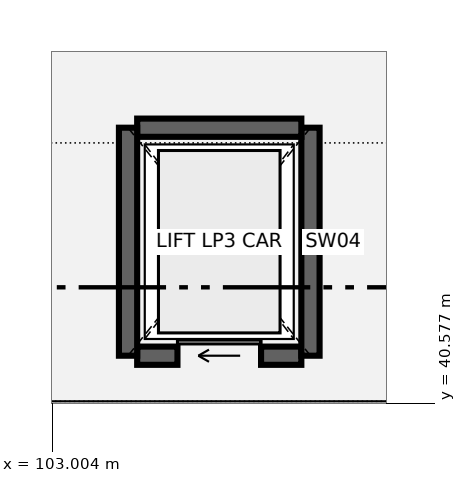
"""IFC4 building model, lengths in metres.
Left out: names, types, materials, properties, quantities, classifications, styles, units other than length and angle.
Written with IfcOpenShell. Run it as: python <this file> out.ifc"""

import sys

from ifc_helpers import new_model, si_unit, direction, frame, frame_2d, origin, place, context, subcontext, project, spatial, rectangle, extrude, element, fill, save


model = new_model("IFC4")
c1 = context("Model", 3, precision=1e-05, world=origin(), true_north=direction((0.0, 1.0)))
c2 = subcontext(c1, "Body", "Model", "MODEL_VIEW")
j1 = project(units=[si_unit("LENGTHUNIT", "METRE"), si_unit("PLANEANGLEUNIT", "RADIAN")], contexts=[c1])
p1 = place(None, origin())
s1 = spatial("IfcSite", under=j1, at=p1, CompositionType="ELEMENT")
p2 = place(p1, origin())
s2 = spatial("IfcBuilding", under=s1, at=p2, CompositionType="ELEMENT")
p3 = place(p2, frame((0.0, 0.0, 5.4)))
s3 = spatial("IfcBuildingStorey", under=s2, at=p3, CompositionType="ELEMENT", Elevation=5.4)
p4 = place(p3, frame((104.12, 41.2, 0.0), z_axis=(0.0, 0.0, 1.0), x_axis=(1.0, 0.0, 0.0)))
e1 = element("IfcWall", 1, at=p4, inside=s3, PredefinedType="SHEAR", context=c2, shape_type="SweptSolid", body=[
    extrude(rectangle(XDim=2.16, YDim=0.24, at=frame_2d((1.08, 0.0))), origin(), (0.0, 0.0, 1.0), 4.5),
])
p5 = place(p4, frame((0.53, 0.0, 0.0)))
e2 = element("IfcOpeningElement", 2, at=p5, cuts=e1, PredefinedType="OPENING", context=c2, shape_type="SweptSolid", body=[
    extrude(rectangle(XDim=1.1, YDim=2.1, at=frame_2d((0.55, 1.05))), frame((0.0, 0.13, 0.0), z_axis=(0.0, -1.0, 0.0), x_axis=(1.0, 0.0, 0.0)), (0.0, 0.0, 1.0), 0.26),
])
p6 = place(p3, frame((106.4, 41.2, 0.0), z_axis=(0.0, 0.0, 1.0), x_axis=(0.0, 1.0, 0.0)))
e3 = element("IfcWall", 3, at=p6, inside=s3, PredefinedType="SHEAR", context=c2, shape_type="SweptSolid", body=[
    extrude(rectangle(XDim=3.0, YDim=0.24, at=frame_2d((1.5, 0.0))), origin(), (0.0, 0.0, 1.0), 4.5),
])
p7 = place(p3, frame((106.28, 44.2, 0.0), z_axis=(0.0, 0.0, 1.0), x_axis=(-1.0, 0.0, 0.0)))
e4 = element("IfcWall", 4, at=p7, inside=s3, PredefinedType="SHEAR", context=c2, shape_type="SweptSolid", body=[
    extrude(rectangle(XDim=2.16, YDim=0.24, at=frame_2d((1.08, 0.0))), origin(), (0.0, 0.0, 1.0), 4.5),
])
p8 = place(p3, frame((104.0, 44.2, 0.0), z_axis=(0.0, 0.0, 1.0), x_axis=(0.0, -1.0, 0.0)))
e5 = element("IfcWall", 5, at=p8, inside=s3, PredefinedType="SHEAR", context=c2, shape_type="SweptSolid", body=[
    extrude(rectangle(XDim=3.0, YDim=0.24, at=frame_2d((1.5, 0.0))), origin(), (0.0, 0.0, 1.0), 4.5),
])
p9 = place(p5, origin())
e6 = element("IfcDoor", 6, at=p9, inside=s3, OperationType="SLIDING_TO_LEFT", PredefinedType="DOOR", context=c2, shape_type="SweptSolid", body=[
    extrude(rectangle(XDim=1.1, YDim=2.1, at=frame_2d((0.55, 1.05))), frame((0.0, 0.025, 0.0), z_axis=(0.0, -1.0, 0.0), x_axis=(1.0, 0.0, 0.0)), (0.0, 0.0, 1.0), 0.05),
])
fill(e2, e6)
save(model, sys.argv[1])
